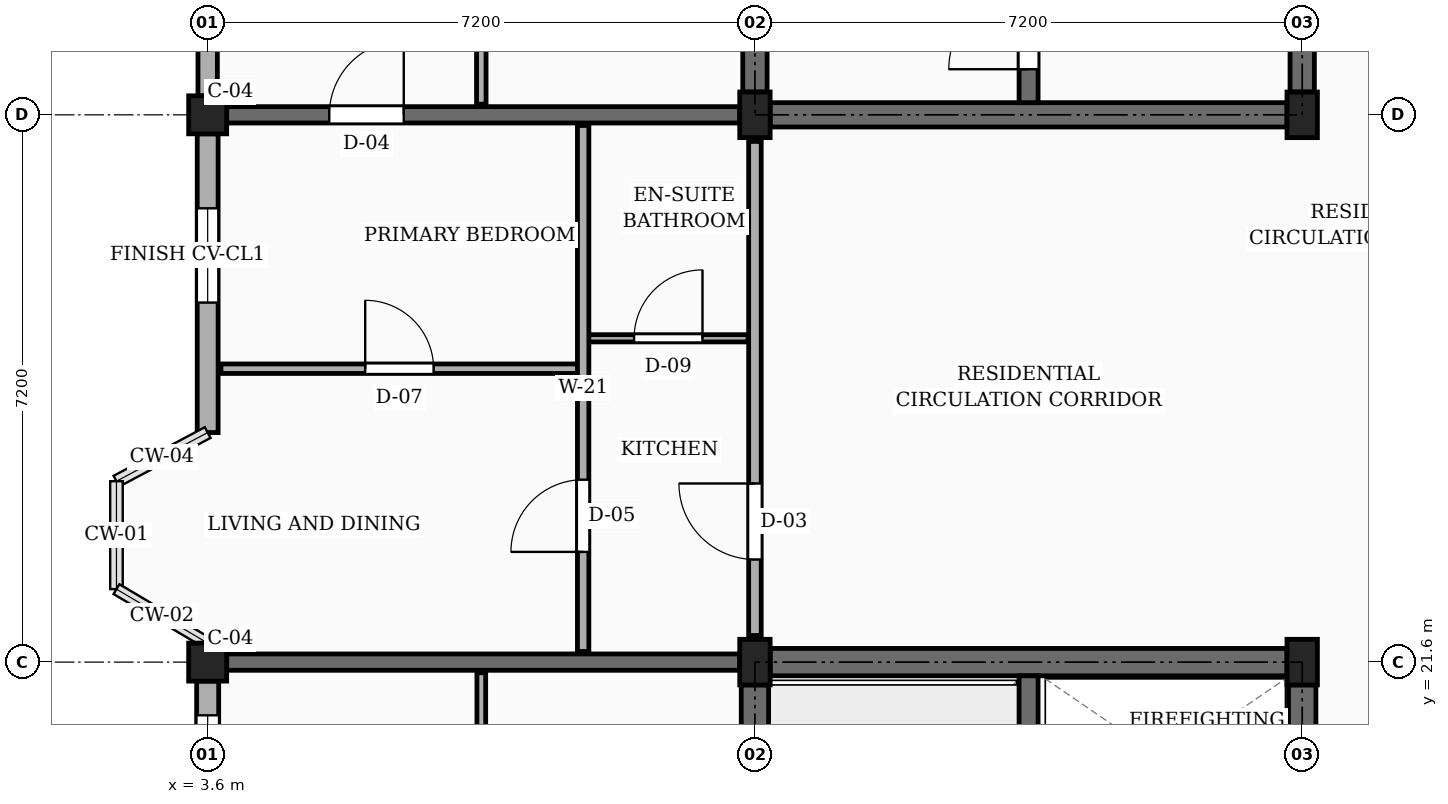
"""IFC4 building model, lengths in metres.
Left out: names, types, materials, properties, quantities, classifications, styles, units other than length and angle.
Written with IfcOpenShell. Run it as: python <this file> out.ifc"""

import sys

from ifc_helpers import new_model, si_unit, direction, frame, frame_2d, origin, origin_2d, place, context, subcontext, project, spatial, rectangle, extrude, element, fill, save


model = new_model("IFC4")
c1 = context("Model", 3, precision=1e-05, world=origin(), true_north=direction((0.0, 1.0)))
c2 = subcontext(c1, "Body", "Model", "MODEL_VIEW")
j1 = project(units=[si_unit("LENGTHUNIT", "METRE"), si_unit("PLANEANGLEUNIT", "RADIAN")], contexts=[c1])
p1 = place(None, origin())
s1 = spatial("IfcSite", under=j1, at=p1, CompositionType="ELEMENT")
p2 = place(p1, origin())
s2 = spatial("IfcBuilding", under=s1, at=p2, CompositionType="ELEMENT")
p3 = place(p2, frame((0.0, 0.0, 29.7)))
s3 = spatial("IfcBuildingStorey", under=s2, at=p3, CompositionType="ELEMENT", Elevation=29.7)
for number, where, z_axis, x_axis in (
    (1, (3.6, 21.6, 0.0), (0.0, 0.0, 1.0), (1.0, 0.0, 0.0)),
    (2, (3.6, 28.8, 0.0), (0.0, 0.0, 1.0), (1.0, 0.0, 0.0)),
):
    element("IfcColumn", number, at=place(p3, frame(where, z_axis=z_axis, x_axis=x_axis)), inside=s3, PredefinedType="COLUMN", context=c2, shape_type="SweptSolid", body=[
        extrude(rectangle(XDim=0.5, YDim=0.5, at=origin_2d()), origin(), (0.0, 0.0, 1.0), 3.15),
    ])
for number, where, z_axis, x_axis in (
    (3, (10.8, 21.6, 0.0), (0.0, 0.0, 1.0), (1.0, 0.0, 0.0)),
    (4, (10.8, 28.8, 0.0), (0.0, 0.0, 1.0), (1.0, 0.0, 0.0)),
    (5, (18.0, 21.6, 0.0), (0.0, 0.0, 1.0), (1.0, 0.0, 0.0)),
    (6, (18.0, 28.8, 0.0), (0.0, 0.0, 1.0), (1.0, 0.0, 0.0)),
):
    element("IfcColumn", number, at=place(p3, frame(where, z_axis=z_axis, x_axis=x_axis)), inside=s3, PredefinedType="COLUMN", context=c2, shape_type="SweptSolid", body=[
        extrude(rectangle(XDim=0.4, YDim=0.6, at=origin_2d()), origin(), (0.0, 0.0, 1.0), 3.15),
    ])
p4 = place(p3, frame((3.85, 21.6, 0.0), z_axis=(0.0, 0.0, 1.0), x_axis=(1.0, 0.0, 0.0)))
e7 = element("IfcWall", 7, at=p4, inside=s3, PredefinedType="SOLIDWALL", context=c2, shape_type="SweptSolid", body=[
    extrude(rectangle(XDim=6.75, YDim=0.215, at=frame_2d((3.375, 0.0))), origin(), (0.0, 0.0, 1.0), 2.17),
])
p5 = place(p3, frame((3.85, 28.8, 0.0), z_axis=(0.0, 0.0, 1.0), x_axis=(1.0, 0.0, 0.0)))
e8 = element("IfcWall", 8, at=p5, inside=s3, PredefinedType="SOLIDWALL", context=c2, shape_type="SweptSolid", body=[
    extrude(rectangle(XDim=6.75, YDim=0.215, at=frame_2d((3.375, 0.0))), origin(), (0.0, 0.0, 1.0), 2.17),
])
p6 = place(p5, frame((1.35, 0.0, 0.0)))
e9 = element("IfcOpeningElement", 9, at=p6, cuts=e8, PredefinedType="OPENING", context=c2, shape_type="SweptSolid", body=[
    extrude(rectangle(XDim=0.98, YDim=2.12, at=frame_2d((0.49, 1.06))), frame((0.0, 0.118, 0.0), z_axis=(0.0, -1.0, 0.0), x_axis=(1.0, 0.0, 0.0)), (0.0, 0.0, 1.0), 0.235),
])
p7 = place(p3, frame((3.6, 35.75, 0.0), z_axis=(0.0, 0.0, 1.0), x_axis=(0.0, -1.0, 0.0)))
e10 = element("IfcWall", 10, at=p7, inside=s3, PredefinedType="SOLIDWALL", context=c2, shape_type="SweptSolid", body=[
    extrude(rectangle(XDim=6.7, YDim=0.255, at=frame_2d((3.35, 0.0))), origin(), (0.0, 0.0, 1.0), 2.44),
])
p8 = place(p7, frame((0.45, 0.0, 0.78)))
e11 = element("IfcOpeningElement", 11, at=p8, cuts=e10, PredefinedType="OPENING", context=c2, shape_type="SweptSolid", body=[
    extrude(rectangle(XDim=1.08, YDim=1.15, at=frame_2d((0.54, 0.575))), frame((0.0, 0.137, 0.0), z_axis=(0.0, -1.0, 0.0), x_axis=(1.0, 0.0, 0.0)), (0.0, 0.0, 1.0), 0.275),
])
p9 = place(p7, frame((4.65, 0.0, 0.78)))
e12 = element("IfcOpeningElement", 12, at=p9, cuts=e10, PredefinedType="OPENING", context=c2, shape_type="SweptSolid", body=[
    extrude(rectangle(XDim=1.24, YDim=1.15, at=frame_2d((0.62, 0.575))), frame((0.0, 0.137, 0.0), z_axis=(0.0, -1.0, 0.0), x_axis=(1.0, 0.0, 0.0)), (0.0, 0.0, 1.0), 0.275),
])
p10 = place(p3, frame((3.6, 28.55, 0.0), z_axis=(0.0, 0.0, 1.0), x_axis=(0.0, -1.0, 0.0)))
e13 = element("IfcWall", 13, at=p10, inside=s3, PredefinedType="SOLIDWALL", context=c2, shape_type="SweptSolid", body=[
    extrude(rectangle(XDim=3.93, YDim=0.275, at=frame_2d((1.965, 0.0))), origin(), (0.0, 0.0, 1.0), 2.44),
])
p11 = place(p10, frame((0.98, 0.0, 0.78)))
e14 = element("IfcOpeningElement", 14, at=p11, cuts=e13, PredefinedType="OPENING", context=c2, shape_type="SweptSolid", body=[
    extrude(rectangle(XDim=1.24, YDim=1.15, at=frame_2d((0.62, 0.575))), frame((0.0, 0.147, 0.0), z_axis=(0.0, -1.0, 0.0), x_axis=(1.0, 0.0, 0.0)), (0.0, 0.0, 1.0), 0.295),
])
p12 = place(p3, frame((3.6, 21.35, 0.0), z_axis=(0.0, 0.0, 1.0), x_axis=(0.0, -1.0, 0.0)))
e15 = element("IfcWall", 15, at=p12, inside=s3, PredefinedType="SOLIDWALL", context=c2, shape_type="SweptSolid", body=[
    extrude(rectangle(XDim=6.7, YDim=0.29, at=frame_2d((3.35, 0.0))), origin(), (0.0, 0.0, 1.0), 2.44),
])
p13 = place(p12, frame((0.45, 0.0, 0.78)))
e16 = element("IfcOpeningElement", 16, at=p13, cuts=e15, PredefinedType="OPENING", context=c2, shape_type="SweptSolid", body=[
    extrude(rectangle(XDim=1.32, YDim=1.15, at=frame_2d((0.66, 0.575))), frame((0.0, 0.155, 0.0), z_axis=(0.0, -1.0, 0.0), x_axis=(1.0, 0.0, 0.0)), (0.0, 0.0, 1.0), 0.31),
])
p14 = place(p12, frame((4.65, 0.0, 0.78)))
e17 = element("IfcOpeningElement", 17, at=p14, cuts=e15, PredefinedType="OPENING", context=c2, shape_type="SweptSolid", body=[
    extrude(rectangle(XDim=0.88, YDim=1.26, at=frame_2d((0.44, 0.63))), frame((0.0, 0.155, 0.0), z_axis=(0.0, -1.0, 0.0), x_axis=(1.0, 0.0, 0.0)), (0.0, 0.0, 1.0), 0.31),
])
p15 = place(p3, frame((10.8, 14.7, 0.0), z_axis=(0.0, 0.0, 1.0), x_axis=(0.0, 1.0, 0.0)))
e18 = element("IfcWall", 18, at=p15, inside=s3, PredefinedType="SHEAR", context=c2, shape_type="SweptSolid", body=[
    extrude(rectangle(XDim=6.6, YDim=0.36, at=frame_2d((3.3, 0.0))), origin(), (0.0, 0.0, 1.0), 2.87),
])
p16 = place(p3, frame((11.0, 21.6, 0.0), z_axis=(0.0, 0.0, 1.0), x_axis=(1.0, 0.0, 0.0)))
e19 = element("IfcWall", 19, at=p16, inside=s3, PredefinedType="SHEAR", context=c2, shape_type="SweptSolid", body=[
    extrude(rectangle(XDim=6.8, YDim=0.36, at=frame_2d((3.4, 0.0))), origin(), (0.0, 0.0, 1.0), 2.87),
])
p17 = place(p3, frame((18.0, 14.7, 0.0), z_axis=(0.0, 0.0, 1.0), x_axis=(0.0, 1.0, 0.0)))
e20 = element("IfcWall", 20, at=p17, inside=s3, PredefinedType="SHEAR", context=c2, shape_type="SweptSolid", body=[
    extrude(rectangle(XDim=6.6, YDim=0.36, at=frame_2d((3.3, 0.0))), origin(), (0.0, 0.0, 1.0), 2.87),
])
p18 = place(p17, frame((1.5, 0.0, 0.0)))
e21 = element("IfcOpeningElement", 21, at=p18, cuts=e20, PredefinedType="OPENING", context=c2, shape_type="SweptSolid", body=[
    extrude(rectangle(XDim=1.1, YDim=2.15, at=frame_2d((0.55, 1.075))), frame((0.0, 0.19, 0.0), z_axis=(0.0, -1.0, 0.0), x_axis=(1.0, 0.0, 0.0)), (0.0, 0.0, 1.0), 0.38),
])
p19 = place(p3, frame((14.4, 14.58, 0.0), z_axis=(0.0, 0.0, 1.0), x_axis=(0.0, 1.0, 0.0)))
e22 = element("IfcWall", 22, at=p19, inside=s3, PredefinedType="SHEAR", context=c2, shape_type="SweptSolid", body=[
    extrude(rectangle(XDim=6.84, YDim=0.25, at=frame_2d((3.42, 0.0))), origin(), (0.0, 0.0, 1.0), 2.87),
])
p20 = place(p19, frame((0.42, 0.0, 0.0)))
e23 = element("IfcOpeningElement", 23, at=p20, cuts=e22, PredefinedType="OPENING", context=c2, shape_type="SweptSolid", body=[
    extrude(rectangle(XDim=1.05, YDim=2.15, at=frame_2d((0.525, 1.075))), frame((0.0, 0.135, 0.0), z_axis=(0.0, -1.0, 0.0), x_axis=(1.0, 0.0, 0.0)), (0.0, 0.0, 1.0), 0.27),
])
p21 = place(p3, frame((10.8, 29.1, 0.0), z_axis=(0.0, 0.0, 1.0), x_axis=(0.0, 1.0, 0.0)))
e24 = element("IfcWall", 24, at=p21, inside=s3, PredefinedType="SHEAR", context=c2, shape_type="SweptSolid", body=[
    extrude(rectangle(XDim=6.6, YDim=0.32, at=frame_2d((3.3, 0.0))), origin(), (0.0, 0.0, 1.0), 2.87),
])
p22 = place(p3, frame((18.0, 29.1, 0.0), z_axis=(0.0, 0.0, 1.0), x_axis=(0.0, 1.0, 0.0)))
e25 = element("IfcWall", 25, at=p22, inside=s3, PredefinedType="SHEAR", context=c2, shape_type="SweptSolid", body=[
    extrude(rectangle(XDim=6.6, YDim=0.32, at=frame_2d((3.3, 0.0))), origin(), (0.0, 0.0, 1.0), 2.87),
])
p23 = place(p22, frame((1.5, 0.0, 0.0)))
e26 = element("IfcOpeningElement", 26, at=p23, cuts=e25, PredefinedType="OPENING", context=c2, shape_type="SweptSolid", body=[
    extrude(rectangle(XDim=1.1, YDim=2.15, at=frame_2d((0.55, 1.075))), frame((0.0, 0.17, 0.0), z_axis=(0.0, -1.0, 0.0), x_axis=(1.0, 0.0, 0.0)), (0.0, 0.0, 1.0), 0.34),
])
p24 = place(p3, frame((11.0, 28.8, 0.0), z_axis=(0.0, 0.0, 1.0), x_axis=(1.0, 0.0, 0.0)))
e27 = element("IfcWall", 27, at=p24, inside=s3, PredefinedType="SHEAR", context=c2, shape_type="SweptSolid", body=[
    extrude(rectangle(XDim=6.8, YDim=0.32, at=frame_2d((3.4, 0.0))), origin(), (0.0, 0.0, 1.0), 2.87),
])
p25 = place(p3, frame((14.4, 28.96, 0.0), z_axis=(0.0, 0.0, 1.0), x_axis=(0.0, 1.0, 0.0)))
e28 = element("IfcWall", 28, at=p25, inside=s3, PredefinedType="SHEAR", context=c2, shape_type="SweptSolid", body=[
    extrude(rectangle(XDim=6.88, YDim=0.25, at=frame_2d((3.44, 0.0))), origin(), (0.0, 0.0, 1.0), 2.87),
])
p26 = place(p25, frame((0.44, 0.0, 0.0)))
e29 = element("IfcOpeningElement", 29, at=p26, cuts=e28, PredefinedType="OPENING", context=c2, shape_type="SweptSolid", body=[
    extrude(rectangle(XDim=1.05, YDim=2.15, at=frame_2d((0.525, 1.075))), frame((0.0, 0.135, 0.0), z_axis=(0.0, -1.0, 0.0), x_axis=(1.0, 0.0, 0.0)), (0.0, 0.0, 1.0), 0.27),
])
p27 = place(p3, frame((10.8, 21.95, 0.0), z_axis=(0.0, 0.0, 1.0), x_axis=(0.0, 1.0, 0.0)))
e30 = element("IfcWall", 30, at=p27, inside=s3, PredefinedType="PARTITIONING", context=c2, shape_type="SweptSolid", body=[
    extrude(rectangle(XDim=6.5, YDim=0.165, at=frame_2d((3.25, 0.0))), origin(), (0.0, 0.0, 1.0), 2.305),
])
p28 = place(p27, frame((1.0, 0.0, 0.0)))
e31 = element("IfcOpeningElement", 31, at=p28, cuts=e30, PredefinedType="OPENING", context=c2, shape_type="SweptSolid", body=[
    extrude(rectangle(XDim=1.0, YDim=2.15, at=frame_2d((0.5, 1.075))), frame((0.0, 0.093, 0.0), z_axis=(0.0, -1.0, 0.0), x_axis=(1.0, 0.0, 0.0)), (0.0, 0.0, 1.0), 0.185),
])
p29 = place(p3, frame((7.2, 14.54, 0.0), z_axis=(0.0, 0.0, 1.0), x_axis=(0.0, 1.0, 0.0)))
e32 = element("IfcWall", 32, at=p29, inside=s3, PredefinedType="PARTITIONING", context=c2, shape_type="SweptSolid", body=[
    extrude(rectangle(XDim=6.92, YDim=0.115, at=frame_2d((3.46, 0.0))), origin(), (0.0, 0.0, 1.0), 2.305),
])
p30 = place(p29, frame((1.05, 0.0, 0.0)))
e33 = element("IfcOpeningElement", 33, at=p30, cuts=e32, PredefinedType="OPENING", context=c2, shape_type="SweptSolid", body=[
    extrude(rectangle(XDim=0.87, YDim=2.05, at=frame_2d((0.435, 1.025))), frame((0.0, 0.067, 0.0), z_axis=(0.0, -1.0, 0.0), x_axis=(1.0, 0.0, 0.0)), (0.0, 0.0, 1.0), 0.135),
])
p31 = place(p29, frame((4.45, 0.0, 0.0)))
e34 = element("IfcOpeningElement", 34, at=p31, cuts=e32, PredefinedType="OPENING", context=c2, shape_type="SweptSolid", body=[
    extrude(rectangle(XDim=0.88, YDim=2.08, at=frame_2d((0.44, 1.04))), frame((0.0, 0.067, 0.0), z_axis=(0.0, -1.0, 0.0), x_axis=(1.0, 0.0, 0.0)), (0.0, 0.0, 1.0), 0.135),
])
p32 = place(p3, frame((3.775, 25.46, 0.0), z_axis=(0.0, 0.0, 1.0), x_axis=(1.0, 0.0, 0.0)))
e35 = element("IfcWall", 35, at=p32, inside=s3, PredefinedType="PARTITIONING", context=c2, shape_type="SweptSolid", body=[
    extrude(rectangle(XDim=4.695, YDim=0.125, at=frame_2d((2.348, 0.0))), origin(), (0.0, 0.0, 1.0), 2.305),
])
p33 = place(p32, frame((1.897, 0.0, 0.0)))
e36 = element("IfcOpeningElement", 36, at=p33, cuts=e35, PredefinedType="OPENING", context=c2, shape_type="SweptSolid", body=[
    extrude(rectangle(XDim=0.9, YDim=2.1, at=frame_2d((0.45, 1.05))), frame((0.0, 0.073, 0.0), z_axis=(0.0, -1.0, 0.0), x_axis=(1.0, 0.0, 0.0)), (0.0, 0.0, 1.0), 0.145),
])
p34 = place(p3, frame((8.61, 25.86, 0.0), z_axis=(0.0, 0.0, 1.0), x_axis=(1.0, 0.0, 0.0)))
e37 = element("IfcWall", 37, at=p34, inside=s3, PredefinedType="PARTITIONING", context=c2, shape_type="SweptSolid", body=[
    extrude(rectangle(XDim=2.1, YDim=0.095, at=frame_2d((1.05, 0.0))), origin(), (0.0, 0.0, 1.0), 2.305),
])
p35 = place(p34, frame((0.6, 0.0, 0.0)))
e38 = element("IfcOpeningElement", 38, at=p35, cuts=e37, PredefinedType="OPENING", context=c2, shape_type="SweptSolid", body=[
    extrude(rectangle(XDim=0.9, YDim=2.05, at=frame_2d((0.45, 1.025))), frame((0.0, 0.058, 0.0), z_axis=(0.0, -1.0, 0.0), x_axis=(1.0, 0.0, 0.0)), (0.0, 0.0, 1.0), 0.115),
])
p36 = place(p3, frame((8.54, 21.74, 0.0), z_axis=(0.0, 0.0, 1.0), x_axis=(0.0, 1.0, 0.0)))
e39 = element("IfcWall", 39, at=p36, inside=s3, PredefinedType="PARTITIONING", context=c2, shape_type="SweptSolid", body=[
    extrude(rectangle(XDim=6.92, YDim=0.15, at=frame_2d((3.46, 0.0))), origin(), (0.0, 0.0, 1.0), 2.305),
])
p37 = place(p36, frame((1.31, 0.0, 0.0)))
e40 = element("IfcOpeningElement", 40, at=p37, cuts=e39, PredefinedType="OPENING", context=c2, shape_type="SweptSolid", body=[
    extrude(rectangle(XDim=0.95, YDim=2.1, at=frame_2d((0.475, 1.05))), frame((0.0, 0.085, 0.0), z_axis=(0.0, -1.0, 0.0), x_axis=(1.0, 0.0, 0.0)), (0.0, 0.0, 1.0), 0.17),
])
p38 = place(p3, frame((7.2, 28.94, 0.0), z_axis=(0.0, 0.0, 1.0), x_axis=(0.0, 1.0, 0.0)))
e41 = element("IfcWall", 41, at=p38, inside=s3, PredefinedType="PARTITIONING", context=c2, shape_type="SweptSolid", body=[
    extrude(rectangle(XDim=6.92, YDim=0.125, at=frame_2d((3.46, 0.0))), origin(), (0.0, 0.0, 1.0), 2.305),
])
p39 = place(p38, frame((1.05, 0.0, 0.0)))
e42 = element("IfcOpeningElement", 42, at=p39, cuts=e41, PredefinedType="OPENING", context=c2, shape_type="SweptSolid", body=[
    extrude(rectangle(XDim=0.87, YDim=2.05, at=frame_2d((0.435, 1.025))), frame((0.0, 0.073, 0.0), z_axis=(0.0, -1.0, 0.0), x_axis=(1.0, 0.0, 0.0)), (0.0, 0.0, 1.0), 0.145),
])
p40 = place(p38, frame((4.45, 0.0, 0.0)))
e43 = element("IfcOpeningElement", 43, at=p40, cuts=e41, PredefinedType="OPENING", context=c2, shape_type="SweptSolid", body=[
    extrude(rectangle(XDim=0.88, YDim=2.08, at=frame_2d((0.44, 1.04))), frame((0.0, 0.073, 0.0), z_axis=(0.0, -1.0, 0.0), x_axis=(1.0, 0.0, 0.0)), (0.0, 0.0, 1.0), 0.145),
])
p41 = place(p11, origin())
e44 = element("IfcWindow", 44, at=p41, inside=s3, PartitioningType="SINGLE_PANEL", PredefinedType="WINDOW", context=c2, shape_type="SweptSolid", body=[
    extrude(rectangle(XDim=1.24, YDim=1.15, at=frame_2d((0.62, 0.575))), frame((0.0, 0.03, 0.0), z_axis=(0.0, -1.0, 0.0), x_axis=(1.0, 0.0, 0.0)), (0.0, 0.0, 1.0), 0.06),
])
fill(e14, e44)
p42 = place(p13, origin())
e45 = element("IfcWindow", 45, at=p42, inside=s3, PartitioningType="SINGLE_PANEL", PredefinedType="WINDOW", context=c2, shape_type="SweptSolid", body=[
    extrude(rectangle(XDim=1.32, YDim=1.15, at=frame_2d((0.66, 0.575))), frame((0.0, 0.03, 0.0), z_axis=(0.0, -1.0, 0.0), x_axis=(1.0, 0.0, 0.0)), (0.0, 0.0, 1.0), 0.06),
])
fill(e16, e45)
p43 = place(p26, origin())
e46 = element("IfcDoor", 46, at=p43, inside=s3, OperationType="SINGLE_SWING_LEFT", PredefinedType="DOOR", context=c2, shape_type="SweptSolid", body=[
    extrude(rectangle(XDim=1.05, YDim=2.15, at=frame_2d((0.525, 1.075))), frame((0.0, 0.025, 0.0), z_axis=(0.0, -1.0, 0.0), x_axis=(1.0, 0.0, 0.0)), (0.0, 0.0, 1.0), 0.05),
])
fill(e29, e46)
p44 = place(p28, origin())
e47 = element("IfcDoor", 47, at=p44, inside=s3, OperationType="SINGLE_SWING_RIGHT", PredefinedType="DOOR", context=c2, shape_type="SweptSolid", body=[
    extrude(rectangle(XDim=1.0, YDim=2.15, at=frame_2d((0.5, 1.075))), frame((0.0, 0.025, 0.0), z_axis=(0.0, -1.0, 0.0), x_axis=(1.0, 0.0, 0.0)), (0.0, 0.0, 1.0), 0.05),
])
fill(e31, e47)
p45 = place(p33, origin())
e48 = element("IfcDoor", 48, at=p45, inside=s3, OperationType="SINGLE_SWING_LEFT", PredefinedType="DOOR", context=c2, shape_type="SweptSolid", body=[
    extrude(rectangle(XDim=0.9, YDim=2.1, at=frame_2d((0.45, 1.05))), frame((0.0, 0.025, 0.0), z_axis=(0.0, -1.0, 0.0), x_axis=(1.0, 0.0, 0.0)), (0.0, 0.0, 1.0), 0.05),
])
fill(e36, e48)
p46 = place(p35, origin())
e49 = element("IfcDoor", 49, at=p46, inside=s3, OperationType="SINGLE_SWING_RIGHT", PredefinedType="DOOR", context=c2, shape_type="SweptSolid", body=[
    extrude(rectangle(XDim=0.9, YDim=2.05, at=frame_2d((0.45, 1.025))), frame((0.0, 0.025, 0.0), z_axis=(0.0, -1.0, 0.0), x_axis=(1.0, 0.0, 0.0)), (0.0, 0.0, 1.0), 0.05),
])
fill(e38, e49)
p47 = place(p37, origin())
e50 = element("IfcDoor", 50, at=p47, inside=s3, OperationType="SINGLE_SWING_LEFT", PredefinedType="DOOR", context=c2, shape_type="SweptSolid", body=[
    extrude(rectangle(XDim=0.95, YDim=2.1, at=frame_2d((0.475, 1.05))), frame((0.0, 0.025, 0.0), z_axis=(0.0, -1.0, 0.0), x_axis=(1.0, 0.0, 0.0)), (0.0, 0.0, 1.0), 0.05),
])
fill(e40, e50)
p48 = place(p6, origin())
e51 = element("IfcDoor", 51, at=p48, inside=s3, OperationType="SINGLE_SWING_RIGHT", PredefinedType="DOOR", context=c2, shape_type="SweptSolid", body=[
    extrude(rectangle(XDim=0.98, YDim=2.12, at=frame_2d((0.49, 1.06))), frame((0.0, 0.025, 0.0), z_axis=(0.0, -1.0, 0.0), x_axis=(1.0, 0.0, 0.0)), (0.0, 0.0, 1.0), 0.05),
])
fill(e9, e51)
save(model, sys.argv[1])
